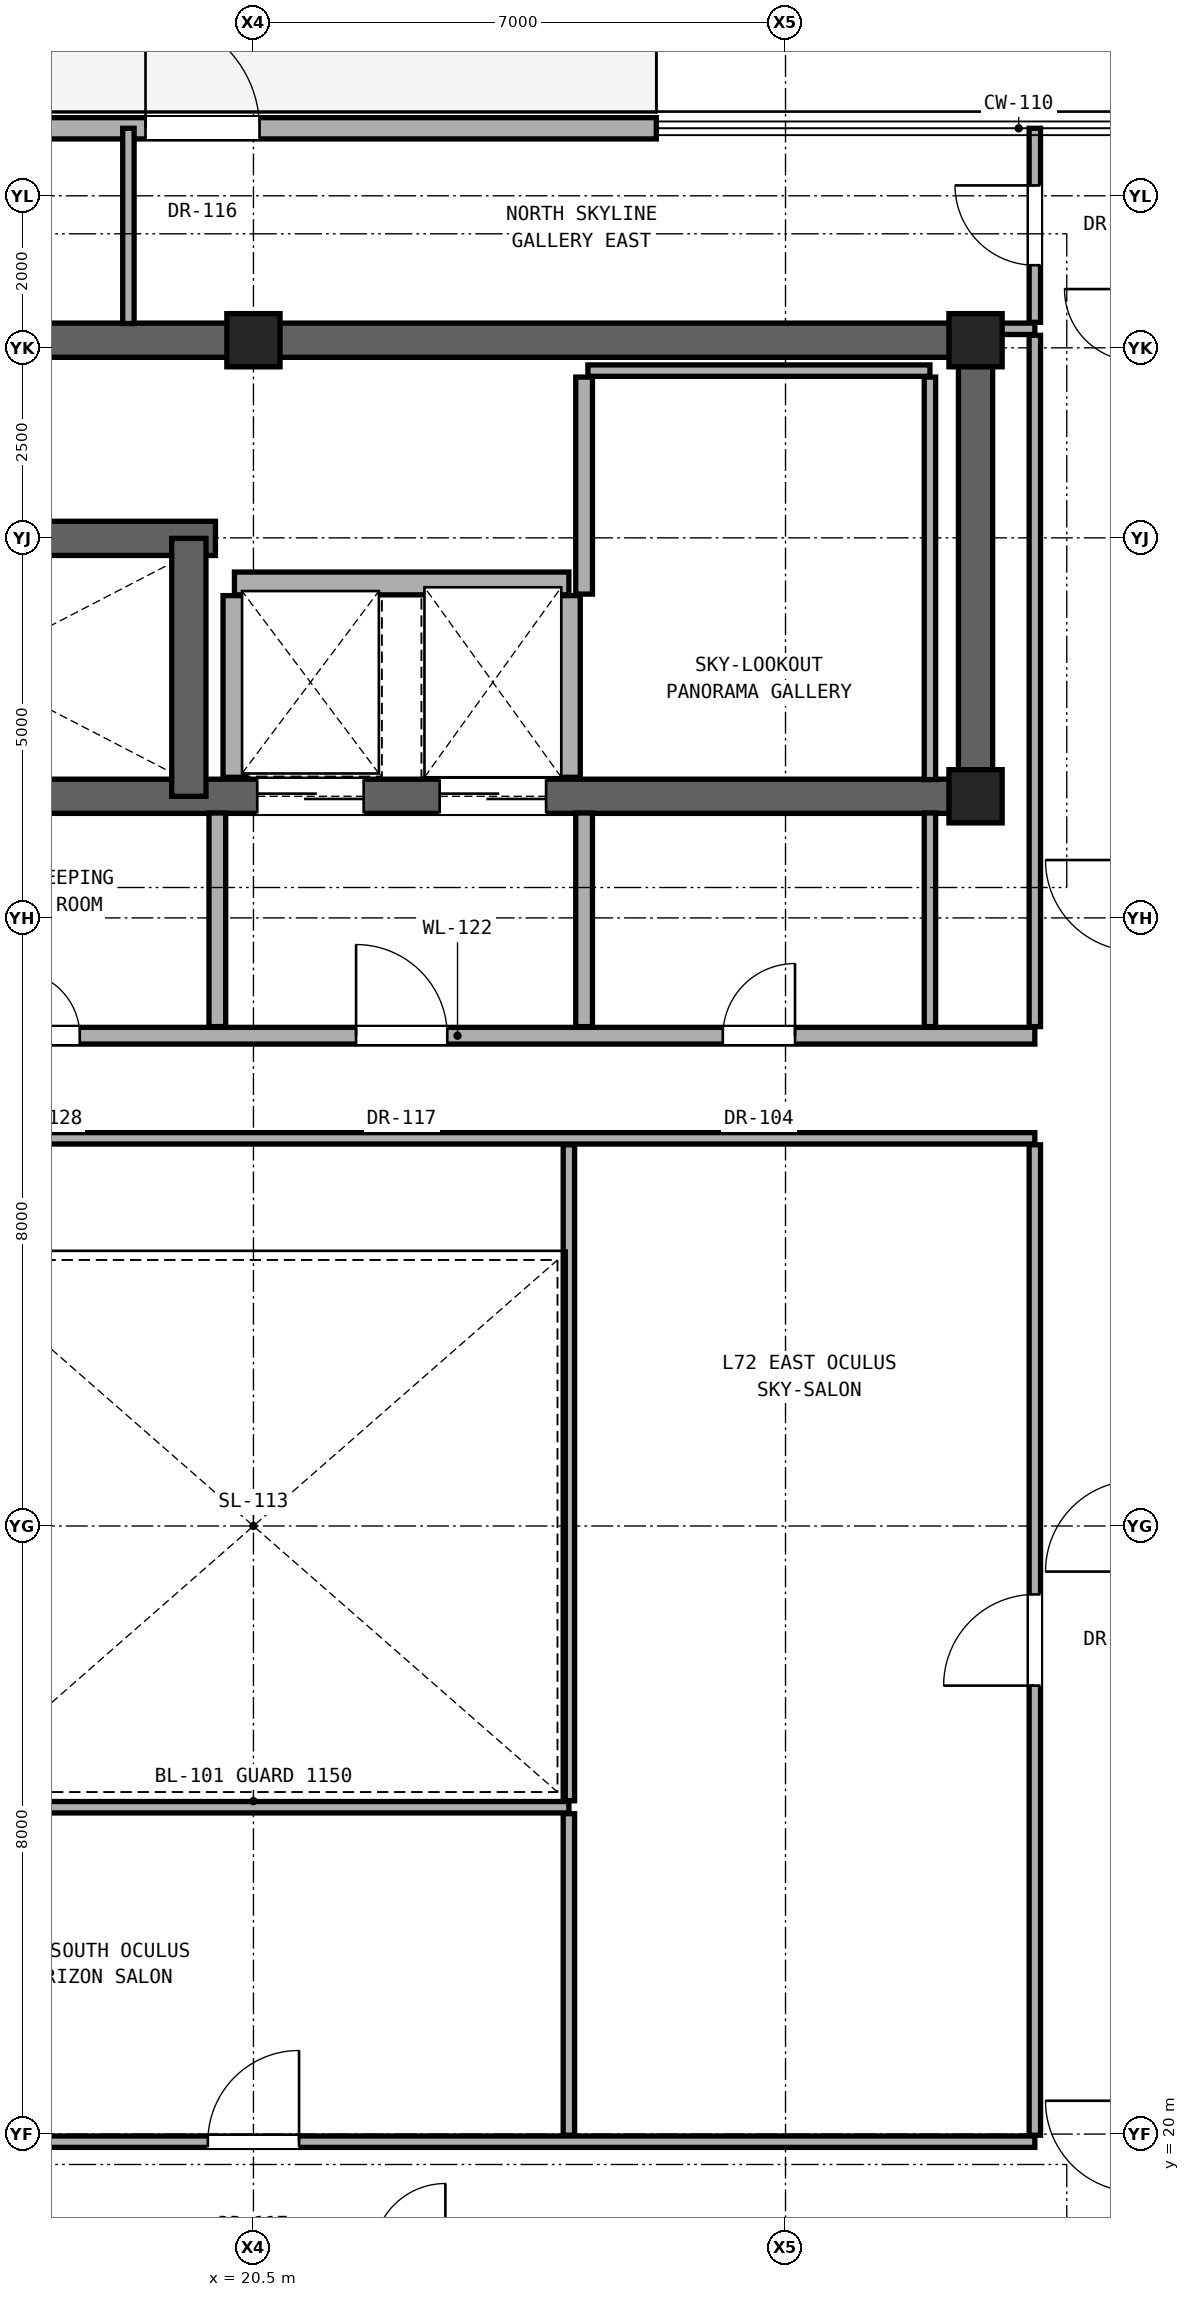
"""IFC4 building model, lengths in metres.
Left out: names, types, materials, properties, quantities, classifications, styles, units other than length and angle.
Written with IfcOpenShell. Run it as: python <this file> out.ifc"""

import sys

from ifc_helpers import new_model, si_unit, direction, frame, frame_2d, origin, origin_2d, place, context, subcontext, project, spatial, rectangle, extrude, element, fill, save


model = new_model("IFC4")
c1 = context("Model", 3, precision=1e-05, world=origin(), true_north=direction((0.0, 1.0)))
c2 = subcontext(c1, "Body", "Model", "MODEL_VIEW")
j1 = project(units=[si_unit("LENGTHUNIT", "METRE"), si_unit("PLANEANGLEUNIT", "RADIAN")], contexts=[c1])
p1 = place(None, origin())
s1 = spatial("IfcSite", under=j1, at=p1, CompositionType="ELEMENT")
p2 = place(p1, origin())
s2 = spatial("IfcBuilding", under=s1, at=p2, CompositionType="ELEMENT")
p3 = place(p2, frame((0.0, 0.0, 252.7)))
s3 = spatial("IfcBuildingStorey", under=s2, at=p3, CompositionType="ELEMENT", Elevation=252.7)
for number, where, z_axis, x_axis in (
    (1, (30.0, 37.6, 0.0), (0.0, 0.0, 1.0), (1.0, 0.0, 0.0)),
    (2, (20.5, 43.6, 0.0), (0.0, 0.0, 1.0), (1.0, 0.0, 0.0)),
    (3, (30.0, 43.6, 0.0), (0.0, 0.0, 1.0), (1.0, 0.0, 0.0)),
):
    element("IfcColumn", number, at=place(p3, frame(where, z_axis=z_axis, x_axis=x_axis)), inside=s3, PredefinedType="COLUMN", context=c2, shape_type="SweptSolid", body=[
        extrude(rectangle(XDim=0.7, YDim=0.7, at=origin_2d()), origin(), (0.0, 0.0, 1.0), 3.6),
    ])
p4 = place(p3, frame((11.0, 43.6, 0.0), z_axis=(0.0, 0.0, 1.0), x_axis=(1.0, 0.0, 0.0)))
e4 = element("IfcWall", 4, at=p4, inside=s3, PredefinedType="SHEAR", context=c2, shape_type="SweptSolid", body=[
    extrude(rectangle(XDim=19.0, YDim=0.45, at=frame_2d((9.5, 0.0))), origin(), (0.0, 0.0, 1.0), 3.4),
])
p5 = place(p3, frame((30.0, 37.6, 0.0), z_axis=(0.0, 0.0, 1.0), x_axis=(0.0, 1.0, 0.0)))
e5 = element("IfcWall", 5, at=p5, inside=s3, PredefinedType="SHEAR", context=c2, shape_type="SweptSolid", body=[
    extrude(rectangle(XDim=6.0, YDim=0.45, at=frame_2d((3.0, 0.0))), origin(), (0.0, 0.0, 1.0), 3.4),
])
p6 = place(p3, frame((11.0, 37.6, 0.0), z_axis=(0.0, 0.0, 1.0), x_axis=(1.0, 0.0, 0.0)))
e6 = element("IfcWall", 6, at=p6, inside=s3, PredefinedType="SHEAR", context=c2, shape_type="SweptSolid", body=[
    extrude(rectangle(XDim=19.0, YDim=0.45, at=frame_2d((9.5, 0.0))), origin(), (0.0, 0.0, 1.0), 3.4),
])
p7 = place(p6, frame((1.06, 0.0, 0.0)))
e7 = element("IfcOpeningElement", 7, at=p7, cuts=e6, PredefinedType="OPENING", context=c2, shape_type="SweptSolid", body=[
    extrude(rectangle(XDim=1.15, YDim=2.2, at=frame_2d((0.575, 1.1))), frame((0.0, 0.235, 0.0), z_axis=(0.0, -1.0, 0.0), x_axis=(1.0, 0.0, 0.0)), (0.0, 0.0, 1.0), 0.47),
])
p8 = place(p6, frame((9.55, 0.0, 0.0)))
e8 = element("IfcOpeningElement", 8, at=p8, cuts=e6, PredefinedType="OPENING", context=c2, shape_type="SweptSolid", body=[
    extrude(rectangle(XDim=1.4, YDim=2.35, at=frame_2d((0.7, 1.175))), frame((0.0, 0.235, 0.0), z_axis=(0.0, -1.0, 0.0), x_axis=(1.0, 0.0, 0.0)), (0.0, 0.0, 1.0), 0.47),
])
p9 = place(p6, frame((11.95, 0.0, 0.0)))
e9 = element("IfcOpeningElement", 9, at=p9, cuts=e6, PredefinedType="OPENING", context=c2, shape_type="SweptSolid", body=[
    extrude(rectangle(XDim=1.4, YDim=2.35, at=frame_2d((0.7, 1.175))), frame((0.0, 0.235, 0.0), z_axis=(0.0, -1.0, 0.0), x_axis=(1.0, 0.0, 0.0)), (0.0, 0.0, 1.0), 0.47),
])
p10 = place(p3, frame((11.0, 40.993, 0.0), z_axis=(0.0, 0.0, 1.0), x_axis=(1.0, 0.0, 0.0)))
e10 = element("IfcWall", 10, at=p10, inside=s3, PredefinedType="SHEAR", context=c2, shape_type="SweptSolid", body=[
    extrude(rectangle(XDim=9.0, YDim=0.45, at=frame_2d((4.5, 0.0))), origin(), (0.0, 0.0, 1.0), 3.4),
])
p11 = place(p3, frame((19.65, 37.6, 0.0), z_axis=(0.0, 0.0, 1.0), x_axis=(0.0, 1.0, 0.0)))
e11 = element("IfcWall", 11, at=p11, inside=s3, PredefinedType="SHEAR", context=c2, shape_type="SweptSolid", body=[
    extrude(rectangle(XDim=3.393, YDim=0.45, at=frame_2d((1.696, 0.0))), origin(), (0.0, 0.0, 1.0), 3.4),
])
p12 = place(p3, frame((15.2, 46.388, 0.0), z_axis=(0.0, 0.0, 1.0), x_axis=(1.0, 0.0, 0.0)))
e12 = element("IfcWall", 12, at=p12, inside=s3, PredefinedType="SOLIDWALL", context=c2, shape_type="SweptSolid", body=[
    extrude(rectangle(XDim=10.6, YDim=0.28, at=frame_2d((5.3, 0.0))), origin(), (0.0, 0.0, 1.0), 3.36),
])
p13 = place(p12, frame((0.55, 0.0, 0.85)))
e13 = element("IfcOpeningElement", 13, at=p13, cuts=e12, PredefinedType="OPENING", context=c2, shape_type="SweptSolid", body=[
    extrude(rectangle(XDim=1.65, YDim=2.2, at=frame_2d((0.825, 1.1))), frame((0.0, 0.15, 0.0), z_axis=(0.0, -1.0, 0.0), x_axis=(1.0, 0.0, 0.0)), (0.0, 0.0, 1.0), 0.3),
])
p14 = place(p12, frame((3.88, 0.0, 0.0)))
e14 = element("IfcOpeningElement", 14, at=p14, cuts=e12, PredefinedType="OPENING", context=c2, shape_type="SweptSolid", body=[
    extrude(rectangle(XDim=1.5, YDim=2.3, at=frame_2d((0.75, 1.15))), frame((0.0, 0.15, 0.0), z_axis=(0.0, -1.0, 0.0), x_axis=(1.0, 0.0, 0.0)), (0.0, 0.0, 1.0), 0.3),
])
p15 = place(p3, frame((10.22, 19.9, 0.0), z_axis=(0.0, 0.0, 1.0), x_axis=(1.0, 0.0, 0.0)))
e15 = element("IfcWall", 15, at=p15, inside=s3, PredefinedType="PARTITIONING", context=c2, shape_type="SweptSolid", body=[
    extrude(rectangle(XDim=20.56, YDim=0.15, at=frame_2d((10.28, 0.0))), origin(), (0.0, 0.0, 1.0), 2.536),
])
p16 = place(p15, frame((1.36, 0.0, 0.0)))
e16 = element("IfcOpeningElement", 16, at=p16, cuts=e15, PredefinedType="OPENING", context=c2, shape_type="SweptSolid", body=[
    extrude(rectangle(XDim=0.9, YDim=2.1, at=frame_2d((0.45, 1.05))), frame((0.0, 0.085, 0.0), z_axis=(0.0, -1.0, 0.0), x_axis=(1.0, 0.0, 0.0)), (0.0, 0.0, 1.0), 0.17),
])
p17 = place(p15, frame((9.68, 0.0, 0.0)))
e17 = element("IfcOpeningElement", 17, at=p17, cuts=e15, PredefinedType="OPENING", context=c2, shape_type="SweptSolid", body=[
    extrude(rectangle(XDim=1.2, YDim=2.25, at=frame_2d((0.6, 1.125))), frame((0.0, 0.085, 0.0), z_axis=(0.0, -1.0, 0.0), x_axis=(1.0, 0.0, 0.0)), (0.0, 0.0, 1.0), 0.17),
])
p18 = place(p3, frame((16.35, 24.3, 0.0), z_axis=(0.0, 0.0, 1.0), x_axis=(1.0, 0.0, 0.0)))
e18 = element("IfcWall", 18, at=p18, inside=s3, PredefinedType="PARTITIONING", context=c2, shape_type="SweptSolid", body=[
    extrude(rectangle(XDim=8.3, YDim=0.15, at=frame_2d((4.15, 0.0))), origin(), (0.0, 0.0, 1.0), 2.975),
])
p19 = place(p3, frame((10.22, 33.1, 0.0), z_axis=(0.0, 0.0, 1.0), x_axis=(1.0, 0.0, 0.0)))
e19 = element("IfcWall", 19, at=p19, inside=s3, PredefinedType="PARTITIONING", context=c2, shape_type="SweptSolid", body=[
    extrude(rectangle(XDim=20.56, YDim=0.15, at=frame_2d((10.28, 0.0))), origin(), (0.0, 0.0, 1.0), 2.536),
])
p20 = place(p3, frame((15.59, 34.45, 0.0), z_axis=(0.0, 0.0, 1.0), x_axis=(1.0, 0.0, 0.0)))
e20 = element("IfcWall", 20, at=p20, inside=s3, PredefinedType="SOLIDWALL", context=c2, shape_type="SweptSolid", body=[
    extrude(rectangle(XDim=15.19, YDim=0.22, at=frame_2d((7.595, 0.0))), origin(), (0.0, 0.0, 1.0), 2.536),
])
p21 = place(p20, frame((6.26, 0.0, 0.0)))
e21 = element("IfcOpeningElement", 21, at=p21, cuts=e20, PredefinedType="OPENING", context=c2, shape_type="SweptSolid", body=[
    extrude(rectangle(XDim=1.2, YDim=2.25, at=frame_2d((0.6, 1.125))), frame((0.0, 0.12, 0.0), z_axis=(0.0, -1.0, 0.0), x_axis=(1.0, 0.0, 0.0)), (0.0, 0.0, 1.0), 0.24),
])
p22 = place(p20, frame((11.085, 0.0, 0.0)))
e22 = element("IfcOpeningElement", 22, at=p22, cuts=e20, PredefinedType="OPENING", context=c2, shape_type="SweptSolid", body=[
    extrude(rectangle(XDim=0.95, YDim=2.15, at=frame_2d((0.475, 1.075))), frame((0.0, 0.12, 0.0), z_axis=(0.0, -1.0, 0.0), x_axis=(1.0, 0.0, 0.0)), (0.0, 0.0, 1.0), 0.24),
])
p23 = place(p20, frame((1.775, 0.0, 0.0)))
e23 = element("IfcOpeningElement", 23, at=p23, cuts=e20, PredefinedType="OPENING", context=c2, shape_type="SweptSolid", body=[
    extrude(rectangle(XDim=0.85, YDim=2.01, at=frame_2d((0.425, 1.005))), frame((0.0, 0.12, 0.0), z_axis=(0.0, -1.0, 0.0), x_axis=(1.0, 0.0, 0.0)), (0.0, 0.0, 1.0), 0.24),
])
p24 = place(p3, frame((20.25, 40.4, 0.0), z_axis=(0.0, 0.0, 1.0), x_axis=(1.0, 0.0, 0.0)))
e24 = element("IfcWall", 24, at=p24, inside=s3, PredefinedType="SOLIDWALL", context=c2, shape_type="SweptSolid", body=[
    extrude(rectangle(XDim=4.4, YDim=0.3, at=frame_2d((2.2, 0.0))), origin(), (0.0, 0.0, 1.0), 3.4),
])
p25 = place(p3, frame((24.9, 43.2, 0.0), z_axis=(0.0, 0.0, 1.0), x_axis=(1.0, 0.0, 0.0)))
e25 = element("IfcWall", 25, at=p25, inside=s3, PredefinedType="PARTITIONING", context=c2, shape_type="SweptSolid", body=[
    extrude(rectangle(XDim=4.5, YDim=0.15, at=frame_2d((2.25, 0.0))), origin(), (0.0, 0.0, 1.0), 3.4),
])
p26 = place(p3, frame((30.22, 43.75, 0.0), z_axis=(0.0, 0.0, 1.0), x_axis=(1.0, 0.0, 0.0)))
e26 = element("IfcWall", 26, at=p26, inside=s3, PredefinedType="PARTITIONING", context=c2, shape_type="SweptSolid", body=[
    extrude(rectangle(XDim=0.56, YDim=0.15, at=frame_2d((0.28, 0.0))), origin(), (0.0, 0.0, 1.0), 3.4),
])
p27 = place(p3, frame((18.855, 43.82, 0.0), z_axis=(0.0, 0.0, 1.0), x_axis=(0.0, 1.0, 0.0)))
e27 = element("IfcWall", 27, at=p27, inside=s3, PredefinedType="PARTITIONING", context=c2, shape_type="SweptSolid", body=[
    extrude(rectangle(XDim=2.568, YDim=0.15, at=frame_2d((1.284, 0.0))), origin(), (0.0, 0.0, 1.0), 3.4),
])
p28 = place(p3, frame((20.025, 34.57, 0.0), z_axis=(0.0, 0.0, 1.0), x_axis=(0.0, 1.0, 0.0)))
e28 = element("IfcWall", 28, at=p28, inside=s3, PredefinedType="SOLIDWALL", context=c2, shape_type="SweptSolid", body=[
    extrude(rectangle(XDim=2.81, YDim=0.22, at=frame_2d((1.405, 0.0))), origin(), (0.0, 0.0, 1.0), 3.4),
])
p29 = place(p3, frame((20.25, 37.85, 0.0), z_axis=(0.0, 0.0, 1.0), x_axis=(0.0, 1.0, 0.0)))
e29 = element("IfcWall", 29, at=p29, inside=s3, PredefinedType="SOLIDWALL", context=c2, shape_type="SweptSolid", body=[
    extrude(rectangle(XDim=2.39, YDim=0.3, at=frame_2d((1.195, 0.0))), origin(), (0.0, 0.0, 1.0), 3.4),
])
p30 = place(p3, frame((24.65, 19.985, 0.0), z_axis=(0.0, 0.0, 1.0), x_axis=(0.0, 1.0, 0.0)))
e30 = element("IfcWall", 30, at=p30, inside=s3, PredefinedType="PARTITIONING", context=c2, shape_type="SweptSolid", body=[
    extrude(rectangle(XDim=4.23, YDim=0.15, at=frame_2d((2.115, 0.0))), origin(), (0.0, 0.0, 1.0), 3.4),
])
p31 = place(p3, frame((24.65, 24.385, 0.0), z_axis=(0.0, 0.0, 1.0), x_axis=(0.0, 1.0, 0.0)))
e31 = element("IfcWall", 31, at=p31, inside=s3, PredefinedType="PARTITIONING", context=c2, shape_type="SweptSolid", body=[
    extrude(rectangle(XDim=8.63, YDim=0.15, at=frame_2d((4.315, 0.0))), origin(), (0.0, 0.0, 1.0), 2.536),
])
p32 = place(p3, frame((24.65, 37.85, 0.0), z_axis=(0.0, 0.0, 1.0), x_axis=(0.0, 1.0, 0.0)))
e32 = element("IfcWall", 32, at=p32, inside=s3, PredefinedType="SOLIDWALL", context=c2, shape_type="SweptSolid", body=[
    extrude(rectangle(XDim=2.39, YDim=0.3, at=frame_2d((1.195, 0.0))), origin(), (0.0, 0.0, 1.0), 3.4),
])
p33 = place(p3, frame((24.85, 34.57, 0.0), z_axis=(0.0, 0.0, 1.0), x_axis=(0.0, 1.0, 0.0)))
e33 = element("IfcWall", 33, at=p33, inside=s3, PredefinedType="SOLIDWALL", context=c2, shape_type="SweptSolid", body=[
    extrude(rectangle(XDim=2.81, YDim=0.22, at=frame_2d((1.405, 0.0))), origin(), (0.0, 0.0, 1.0), 3.4),
])
p34 = place(p3, frame((24.85, 40.26, 0.0), z_axis=(0.0, 0.0, 1.0), x_axis=(0.0, 1.0, 0.0)))
e34 = element("IfcWall", 34, at=p34, inside=s3, PredefinedType="SOLIDWALL", context=c2, shape_type="SweptSolid", body=[
    extrude(rectangle(XDim=2.855, YDim=0.22, at=frame_2d((1.427, 0.0))), origin(), (0.0, 0.0, 1.0), 3.4),
])
p35 = place(p3, frame((29.4, 34.57, 0.0), z_axis=(0.0, 0.0, 1.0), x_axis=(0.0, 1.0, 0.0)))
e35 = element("IfcWall", 35, at=p35, inside=s3, PredefinedType="PARTITIONING", context=c2, shape_type="SweptSolid", body=[
    extrude(rectangle(XDim=2.81, YDim=0.15, at=frame_2d((1.405, 0.0))), origin(), (0.0, 0.0, 1.0), 3.4),
])
p36 = place(p3, frame((29.4, 37.82, 0.0), z_axis=(0.0, 0.0, 1.0), x_axis=(0.0, 1.0, 0.0)))
e36 = element("IfcWall", 36, at=p36, inside=s3, PredefinedType="PARTITIONING", context=c2, shape_type="SweptSolid", body=[
    extrude(rectangle(XDim=5.295, YDim=0.15, at=frame_2d((2.647, 0.0))), origin(), (0.0, 0.0, 1.0), 3.4),
])
p37 = place(p3, frame((30.78, 19.985, 0.0), z_axis=(0.0, 0.0, 1.0), x_axis=(0.0, 1.0, 0.0)))
e37 = element("IfcWall", 37, at=p37, inside=s3, PredefinedType="PARTITIONING", context=c2, shape_type="SweptSolid", body=[
    extrude(rectangle(XDim=13.03, YDim=0.15, at=frame_2d((6.515, 0.0))), origin(), (0.0, 0.0, 1.0), 2.696),
])
p38 = place(p37, frame((5.915, 0.0, 0.0)))
e38 = element("IfcOpeningElement", 38, at=p38, cuts=e37, PredefinedType="OPENING", context=c2, shape_type="SweptSolid", body=[
    extrude(rectangle(XDim=1.2, YDim=2.25, at=frame_2d((0.6, 1.125))), frame((0.0, 0.085, 0.0), z_axis=(0.0, -1.0, 0.0), x_axis=(1.0, 0.0, 0.0)), (0.0, 0.0, 1.0), 0.17),
])
p39 = place(p3, frame((30.78, 34.57, 0.0), z_axis=(0.0, 0.0, 1.0), x_axis=(0.0, 1.0, 0.0)))
e39 = element("IfcWall", 39, at=p39, inside=s3, PredefinedType="PARTITIONING", context=c2, shape_type="SweptSolid", body=[
    extrude(rectangle(XDim=9.095, YDim=0.15, at=frame_2d((4.547, 0.0))), origin(), (0.0, 0.0, 1.0), 2.792),
])
p40 = place(p3, frame((30.78, 43.835, 0.0), z_axis=(0.0, 0.0, 1.0), x_axis=(0.0, 1.0, 0.0)))
e40 = element("IfcWall", 40, at=p40, inside=s3, PredefinedType="PARTITIONING", context=c2, shape_type="SweptSolid", body=[
    extrude(rectangle(XDim=2.553, YDim=0.15, at=frame_2d((1.276, 0.0))), origin(), (0.0, 0.0, 1.0), 3.4),
])
p41 = place(p40, frame((0.751, 0.0, 0.0)))
e41 = element("IfcOpeningElement", 41, at=p41, cuts=e40, PredefinedType="OPENING", context=c2, shape_type="SweptSolid", body=[
    extrude(rectangle(XDim=1.05, YDim=2.2, at=frame_2d((0.525, 1.1))), frame((0.0, 0.085, 0.0), z_axis=(0.0, -1.0, 0.0), x_axis=(1.0, 0.0, 0.0)), (0.0, 0.0, 1.0), 0.17),
])
p42 = place(p14, origin())
e42 = element("IfcDoor", 42, at=p42, inside=s3, OperationType="SINGLE_SWING_LEFT", PredefinedType="DOOR", context=c2, shape_type="SweptSolid", body=[
    extrude(rectangle(XDim=1.5, YDim=2.3, at=frame_2d((0.75, 1.15))), frame((0.0, 0.025, 0.0), z_axis=(0.0, -1.0, 0.0), x_axis=(1.0, 0.0, 0.0)), (0.0, 0.0, 1.0), 0.05),
])
fill(e14, e42)
p43 = place(p21, origin())
e43 = element("IfcDoor", 43, at=p43, inside=s3, OperationType="SINGLE_SWING_LEFT", PredefinedType="DOOR", context=c2, shape_type="SweptSolid", body=[
    extrude(rectangle(XDim=1.2, YDim=2.25, at=frame_2d((0.6, 1.125))), frame((0.0, 0.025, 0.0), z_axis=(0.0, -1.0, 0.0), x_axis=(1.0, 0.0, 0.0)), (0.0, 0.0, 1.0), 0.05),
])
fill(e21, e43)
p44 = place(p22, origin())
e44 = element("IfcDoor", 44, at=p44, inside=s3, OperationType="SINGLE_SWING_RIGHT", PredefinedType="DOOR", context=c2, shape_type="SweptSolid", body=[
    extrude(rectangle(XDim=0.95, YDim=2.15, at=frame_2d((0.475, 1.075))), frame((0.0, 0.025, 0.0), z_axis=(0.0, -1.0, 0.0), x_axis=(1.0, 0.0, 0.0)), (0.0, 0.0, 1.0), 0.05),
])
fill(e22, e44)
p45 = place(p23, origin())
e45 = element("IfcDoor", 45, at=p45, inside=s3, OperationType="SINGLE_SWING_LEFT", PredefinedType="DOOR", context=c2, shape_type="SweptSolid", body=[
    extrude(rectangle(XDim=0.85, YDim=2.01, at=frame_2d((0.425, 1.005))), frame((0.0, 0.025, 0.0), z_axis=(0.0, -1.0, 0.0), x_axis=(1.0, 0.0, 0.0)), (0.0, 0.0, 1.0), 0.05),
])
fill(e23, e45)
p46 = place(p17, origin())
e46 = element("IfcDoor", 46, at=p46, inside=s3, OperationType="SINGLE_SWING_RIGHT", PredefinedType="DOOR", context=c2, shape_type="SweptSolid", body=[
    extrude(rectangle(XDim=1.2, YDim=2.25, at=frame_2d((0.6, 1.125))), frame((0.0, 0.025, 0.0), z_axis=(0.0, -1.0, 0.0), x_axis=(1.0, 0.0, 0.0)), (0.0, 0.0, 1.0), 0.05),
])
fill(e17, e46)
p47 = place(p38, origin())
e47 = element("IfcDoor", 47, at=p47, inside=s3, OperationType="SINGLE_SWING_LEFT", PredefinedType="DOOR", context=c2, shape_type="SweptSolid", body=[
    extrude(rectangle(XDim=1.2, YDim=2.25, at=frame_2d((0.6, 1.125))), frame((0.0, 0.025, 0.0), z_axis=(0.0, -1.0, 0.0), x_axis=(1.0, 0.0, 0.0)), (0.0, 0.0, 1.0), 0.05),
])
fill(e38, e47)
p48 = place(p41, origin())
e48 = element("IfcDoor", 48, at=p48, inside=s3, OperationType="SINGLE_SWING_RIGHT", PredefinedType="DOOR", context=c2, shape_type="SweptSolid", body=[
    extrude(rectangle(XDim=1.05, YDim=2.2, at=frame_2d((0.525, 1.1))), frame((0.0, 0.025, 0.0), z_axis=(0.0, -1.0, 0.0), x_axis=(1.0, 0.0, 0.0)), (0.0, 0.0, 1.0), 0.05),
])
fill(e41, e48)
p49 = place(p8, origin())
e49 = element("IfcDoor", 49, at=p49, inside=s3, OperationType="DOUBLE_DOOR_SLIDING", PredefinedType="DOOR", context=c2, shape_type="SweptSolid", body=[
    extrude(rectangle(XDim=1.4, YDim=2.35, at=frame_2d((0.7, 1.175))), frame((0.0, 0.025, 0.0), z_axis=(0.0, -1.0, 0.0), x_axis=(1.0, 0.0, 0.0)), (0.0, 0.0, 1.0), 0.05),
])
fill(e8, e49)
p50 = place(p9, origin())
e50 = element("IfcDoor", 50, at=p50, inside=s3, OperationType="DOUBLE_DOOR_SLIDING", PredefinedType="DOOR", context=c2, shape_type="SweptSolid", body=[
    extrude(rectangle(XDim=1.4, YDim=2.35, at=frame_2d((0.7, 1.175))), frame((0.0, 0.025, 0.0), z_axis=(0.0, -1.0, 0.0), x_axis=(1.0, 0.0, 0.0)), (0.0, 0.0, 1.0), 0.05),
])
fill(e9, e50)
save(model, sys.argv[1])
